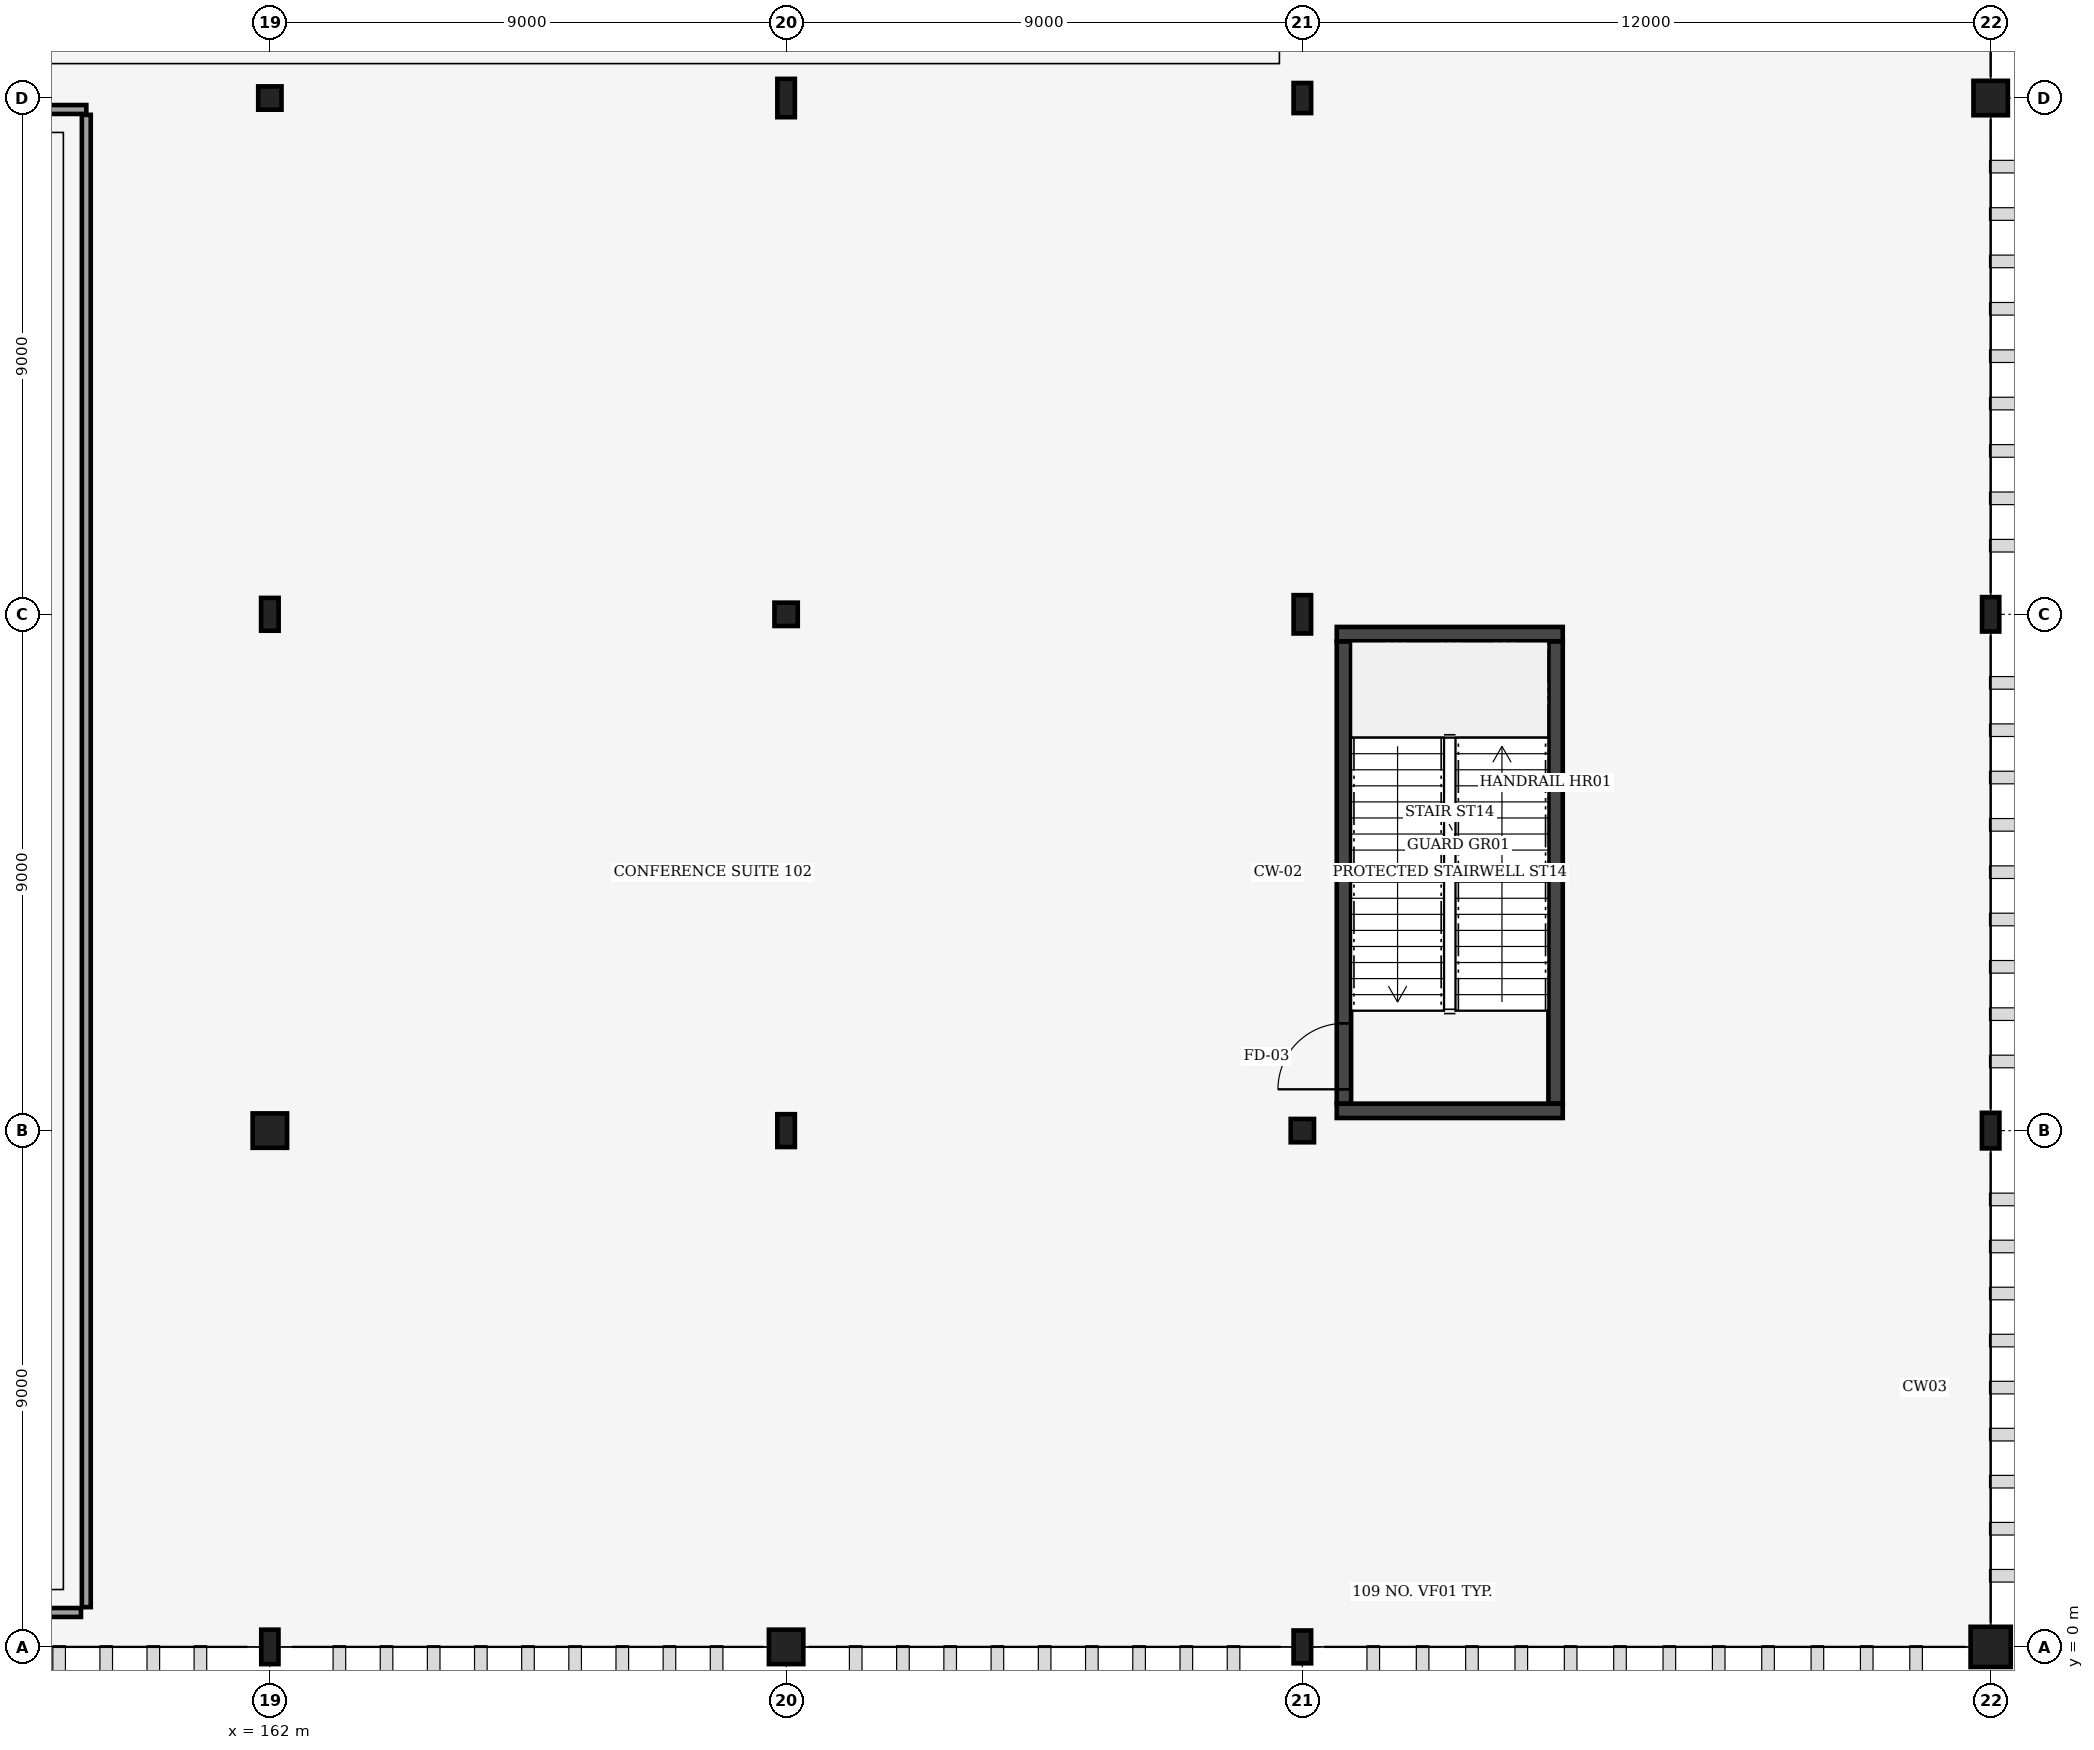
"""IFC4 building model, lengths in metres.
Left out: names, types, materials, properties, quantities, classifications, styles, units other than length and angle.
Written with IfcOpenShell. Run it as: python <this file> out.ifc"""

import sys

from ifc_helpers import new_model, si_unit, direction, frame, frame_2d, origin, origin_2d, place, context, subcontext, project, spatial, rectangle, hollow_circle, i_section, extrude, element, fill, save


model = new_model("IFC4")
c1 = context("Model", 3, precision=1e-05, world=origin(), true_north=direction((0.0, 1.0)))
c2 = subcontext(c1, "Body", "Model", "MODEL_VIEW")
j1 = project(units=[si_unit("LENGTHUNIT", "METRE"), si_unit("PLANEANGLEUNIT", "RADIAN")], contexts=[c1])
p1 = place(None, origin())
s1 = spatial("IfcSite", under=j1, at=p1, CompositionType="ELEMENT")
p2 = place(p1, origin())
s2 = spatial("IfcBuilding", under=s1, at=p2, CompositionType="ELEMENT")
p3 = place(p2, frame((0.0, 0.0, 6.0)))
s3 = spatial("IfcBuildingStorey", under=s2, at=p3, CompositionType="ELEMENT", Elevation=6.0)
p4 = place(p3, frame((162.0, 0.0, 0.0), z_axis=(0.0, 0.0, 1.0), x_axis=(1.0, 0.0, 0.0)))
e1 = element("IfcColumn", 1, at=p4, inside=s3, PredefinedType="COLUMN", context=c2, shape_type="SweptSolid", body=[
    extrude(i_section(OverallWidth=0.3, OverallDepth=0.6, WebThickness=0.015, FlangeThickness=0.03, FilletRadius=0.027, at=origin_2d()), origin(), (0.0, 0.0, 1.0), 6.0),
])
p5 = place(p3, frame((162.0, 9.0, 0.0), z_axis=(0.0, 0.0, 1.0), x_axis=(1.0, 0.0, 0.0)))
e2 = element("IfcColumn", 2, at=p5, inside=s3, PredefinedType="COLUMN", context=c2, shape_type="SweptSolid", body=[
    extrude(rectangle(XDim=0.6, YDim=0.6, at=origin_2d()), origin(), (0.0, 0.0, 1.0), 6.0),
])
p6 = place(p3, frame((162.0, 18.0, 0.0), z_axis=(0.0, 0.0, 1.0), x_axis=(1.0, 0.0, 0.0)))
e3 = element("IfcColumn", 3, at=p6, inside=s3, PredefinedType="COLUMN", context=c2, shape_type="SweptSolid", body=[
    extrude(i_section(OverallWidth=0.306, OverallDepth=0.572, WebThickness=0.021, FlangeThickness=0.04, FilletRadius=0.027, at=origin_2d()), origin(), (0.0, 0.0, 1.0), 6.0),
])
p7 = place(p3, frame((162.0, 27.0, 0.0), z_axis=(0.0, 0.0, 1.0), x_axis=(1.0, 0.0, 0.0)))
e4 = element("IfcColumn", 4, at=p7, inside=s3, PredefinedType="COLUMN", context=c2, shape_type="SweptSolid", body=[
    extrude(hollow_circle(Radius=0.203, WallThickness=0.016, at=origin_2d()), origin(), (0.0, 0.0, 1.0), 6.0),
])
p8 = place(p3, frame((171.0, 0.0, 0.0), z_axis=(0.0, 0.0, 1.0), x_axis=(1.0, 0.0, 0.0)))
e5 = element("IfcColumn", 5, at=p8, inside=s3, PredefinedType="COLUMN", context=c2, shape_type="SweptSolid", body=[
    extrude(rectangle(XDim=0.6, YDim=0.6, at=origin_2d()), origin(), (0.0, 0.0, 1.0), 6.0),
])
p9 = place(p3, frame((171.0, 9.0, 0.0), z_axis=(0.0, 0.0, 1.0), x_axis=(1.0, 0.0, 0.0)))
e6 = element("IfcColumn", 6, at=p9, inside=s3, PredefinedType="COLUMN", context=c2, shape_type="SweptSolid", body=[
    extrude(i_section(OverallWidth=0.306, OverallDepth=0.572, WebThickness=0.021, FlangeThickness=0.04, FilletRadius=0.027, at=origin_2d()), origin(), (0.0, 0.0, 1.0), 6.0),
])
p10 = place(p3, frame((171.0, 18.0, 0.0), z_axis=(0.0, 0.0, 1.0), x_axis=(1.0, 0.0, 0.0)))
e7 = element("IfcColumn", 7, at=p10, inside=s3, PredefinedType="COLUMN", context=c2, shape_type="SweptSolid", body=[
    extrude(hollow_circle(Radius=0.203, WallThickness=0.016, at=origin_2d()), origin(), (0.0, 0.0, 1.0), 6.0),
])
p11 = place(p3, frame((171.0, 27.0, 0.0), z_axis=(0.0, 0.0, 1.0), x_axis=(1.0, 0.0, 0.0)))
e8 = element("IfcColumn", 8, at=p11, inside=s3, PredefinedType="COLUMN", context=c2, shape_type="SweptSolid", body=[
    extrude(i_section(OverallWidth=0.305, OverallDepth=0.668, WebThickness=0.021, FlangeThickness=0.04, FilletRadius=0.027, at=origin_2d()), origin(), (0.0, 0.0, 1.0), 6.0),
])
p12 = place(p3, frame((180.0, 0.0, 0.0), z_axis=(0.0, 0.0, 1.0), x_axis=(1.0, 0.0, 0.0)))
e9 = element("IfcColumn", 9, at=p12, inside=s3, PredefinedType="COLUMN", context=c2, shape_type="SweptSolid", body=[
    extrude(i_section(OverallWidth=0.306, OverallDepth=0.572, WebThickness=0.021, FlangeThickness=0.04, FilletRadius=0.027, at=origin_2d()), origin(), (0.0, 0.0, 1.0), 6.0),
])
p13 = place(p3, frame((180.0, 9.0, 0.0), z_axis=(0.0, 0.0, 1.0), x_axis=(1.0, 0.0, 0.0)))
e10 = element("IfcColumn", 10, at=p13, inside=s3, PredefinedType="COLUMN", context=c2, shape_type="SweptSolid", body=[
    extrude(hollow_circle(Radius=0.203, WallThickness=0.016, at=origin_2d()), origin(), (0.0, 0.0, 1.0), 6.0),
])
p14 = place(p3, frame((180.0, 18.0, 0.0), z_axis=(0.0, 0.0, 1.0), x_axis=(1.0, 0.0, 0.0)))
e11 = element("IfcColumn", 11, at=p14, inside=s3, PredefinedType="COLUMN", context=c2, shape_type="SweptSolid", body=[
    extrude(i_section(OverallWidth=0.305, OverallDepth=0.668, WebThickness=0.021, FlangeThickness=0.04, FilletRadius=0.027, at=origin_2d()), origin(), (0.0, 0.0, 1.0), 6.0),
])
p15 = place(p3, frame((180.0, 27.0, 0.0), z_axis=(0.0, 0.0, 1.0), x_axis=(1.0, 0.0, 0.0)))
e12 = element("IfcColumn", 12, at=p15, inside=s3, PredefinedType="COLUMN", context=c2, shape_type="SweptSolid", body=[
    extrude(i_section(OverallWidth=0.306, OverallDepth=0.524, WebThickness=0.021, FlangeThickness=0.04, FilletRadius=0.027, at=origin_2d()), origin(), (0.0, 0.0, 1.0), 6.0),
])
p16 = place(p3, frame((192.0, 0.0, 0.0), z_axis=(0.0, 0.0, 1.0), x_axis=(1.0, 0.0, 0.0)))
e13 = element("IfcColumn", 13, at=p16, inside=s3, PredefinedType="COLUMN", context=c2, shape_type="SweptSolid", body=[
    extrude(rectangle(XDim=0.7, YDim=0.7, at=origin_2d()), origin(), (0.0, 0.0, 1.0), 6.0),
])
p17 = place(p3, frame((192.0, 9.0, 0.0), z_axis=(0.0, 0.0, 1.0), x_axis=(1.0, 0.0, 0.0)))
e14 = element("IfcColumn", 14, at=p17, inside=s3, PredefinedType="COLUMN", context=c2, shape_type="SweptSolid", body=[
    extrude(i_section(OverallWidth=0.305, OverallDepth=0.62, WebThickness=0.021, FlangeThickness=0.04, FilletRadius=0.027, at=origin_2d()), origin(), (0.0, 0.0, 1.0), 6.0),
])
p18 = place(p3, frame((192.0, 18.0, 0.0), z_axis=(0.0, 0.0, 1.0), x_axis=(1.0, 0.0, 0.0)))
e15 = element("IfcColumn", 15, at=p18, inside=s3, PredefinedType="COLUMN", context=c2, shape_type="SweptSolid", body=[
    extrude(i_section(OverallWidth=0.3, OverallDepth=0.6, WebThickness=0.015, FlangeThickness=0.03, FilletRadius=0.027, at=origin_2d()), origin(), (0.0, 0.0, 1.0), 6.0),
])
p19 = place(p3, frame((192.0, 27.0, 0.0), z_axis=(0.0, 0.0, 1.0), x_axis=(1.0, 0.0, 0.0)))
e16 = element("IfcColumn", 16, at=p19, inside=s3, PredefinedType="COLUMN", context=c2, shape_type="SweptSolid", body=[
    extrude(rectangle(XDim=0.6, YDim=0.6, at=origin_2d()), origin(), (0.0, 0.0, 1.0), 6.0),
])
p20 = place(p3, frame((180.725, 9.47, 0.0), z_axis=(0.0, 0.0, 1.0), x_axis=(0.0, 1.0, 0.0)))
e17 = element("IfcWall", 17, at=p20, inside=s3, PredefinedType="SHEAR", context=c2, shape_type="SweptSolid", body=[
    extrude(rectangle(XDim=8.06, YDim=0.25, at=frame_2d((4.03, 0.0))), origin(), (0.0, 0.0, 1.0), 5.63),
])
p21 = place(p20, frame((0.25, 0.0, 0.0)))
e18 = element("IfcOpeningElement", 18, at=p21, cuts=e17, PredefinedType="OPENING", context=c2, shape_type="SweptSolid", body=[
    extrude(rectangle(XDim=1.15, YDim=2.15, at=frame_2d((0.575, 1.075))), frame((0.0, 0.135, 0.0), z_axis=(0.0, -1.0, 0.0), x_axis=(1.0, 0.0, 0.0)), (0.0, 0.0, 1.0), 0.27),
])
p22 = place(p3, frame((184.415, 9.47, 0.0), z_axis=(0.0, 0.0, 1.0), x_axis=(0.0, 1.0, 0.0)))
e19 = element("IfcWall", 19, at=p22, inside=s3, PredefinedType="SHEAR", context=c2, shape_type="SweptSolid", body=[
    extrude(rectangle(XDim=8.06, YDim=0.25, at=frame_2d((4.03, 0.0))), origin(), (0.0, 0.0, 1.0), 5.63),
])
for number, where, z_axis, x_axis in (
    (20, (180.6, 9.345, 0.0), (0.0, 0.0, 1.0), (1.0, 0.0, 0.0)),
    (21, (180.6, 17.655, 0.0), (0.0, 0.0, 1.0), (1.0, 0.0, 0.0)),
):
    element("IfcWall", number, at=place(p3, frame(where, z_axis=z_axis, x_axis=x_axis)), inside=s3, PredefinedType="SHEAR", context=c2, shape_type="SweptSolid", body=[
        extrude(rectangle(XDim=3.94, YDim=0.25, at=frame_2d((1.97, 0.0))), origin(), (0.0, 0.0, 1.0), 5.63),
    ])
p23 = place(p3, frame((126.6, 26.8, 0.0), z_axis=(0.0, 0.0, 1.0), x_axis=(1.0, 0.0, 0.0)))
e22 = element("IfcWall", 22, at=p23, inside=s3, PredefinedType="PARTITIONING", context=c2, shape_type="SweptSolid", body=[
    extrude(rectangle(XDim=32.2, YDim=0.155, at=frame_2d((16.1, 0.0))), origin(), (0.0, 0.0, 1.0), 4.85),
])
p24 = place(p23, frame((0.85, 0.0, 0.0)))
e23 = element("IfcOpeningElement", 23, at=p24, cuts=e22, PredefinedType="OPENING", context=c2, shape_type="SweptSolid", body=[
    extrude(rectangle(XDim=0.98, YDim=2.12, at=frame_2d((0.49, 1.06))), frame((0.0, 0.087, 0.0), z_axis=(0.0, -1.0, 0.0), x_axis=(1.0, 0.0, 0.0)), (0.0, 0.0, 1.0), 0.175),
])
p25 = place(p3, frame((126.693, 0.6, 0.0), z_axis=(0.0, 0.0, 1.0), x_axis=(1.0, 0.0, 0.0)))
e24 = element("IfcWall", 24, at=p25, inside=s3, PredefinedType="PARTITIONING", context=c2, shape_type="SweptSolid", body=[
    extrude(rectangle(XDim=32.014, YDim=0.155, at=frame_2d((16.007, 0.0))), origin(), (0.0, 0.0, 1.0), 4.85),
])
p26 = place(p3, frame((158.8, 0.693, 0.0), z_axis=(0.0, 0.0, 1.0), x_axis=(0.0, 1.0, 0.0)))
e25 = element("IfcWall", 25, at=p26, inside=s3, PredefinedType="PARTITIONING", context=c2, shape_type="SweptSolid", body=[
    extrude(rectangle(XDim=26.014, YDim=0.155, at=frame_2d((13.007, 0.0))), origin(), (0.0, 0.0, 1.0), 4.85),
])
p27 = place(p21, origin())
e26 = element("IfcDoor", 26, at=p27, inside=s3, OperationType="SINGLE_SWING_LEFT", PredefinedType="DOOR", context=c2, shape_type="SweptSolid", body=[
    extrude(rectangle(XDim=1.15, YDim=2.15, at=frame_2d((0.575, 1.075))), frame((0.0, 0.025, 0.0), z_axis=(0.0, -1.0, 0.0), x_axis=(1.0, 0.0, 0.0)), (0.0, 0.0, 1.0), 0.05),
])
fill(e18, e26)
save(model, sys.argv[1])
